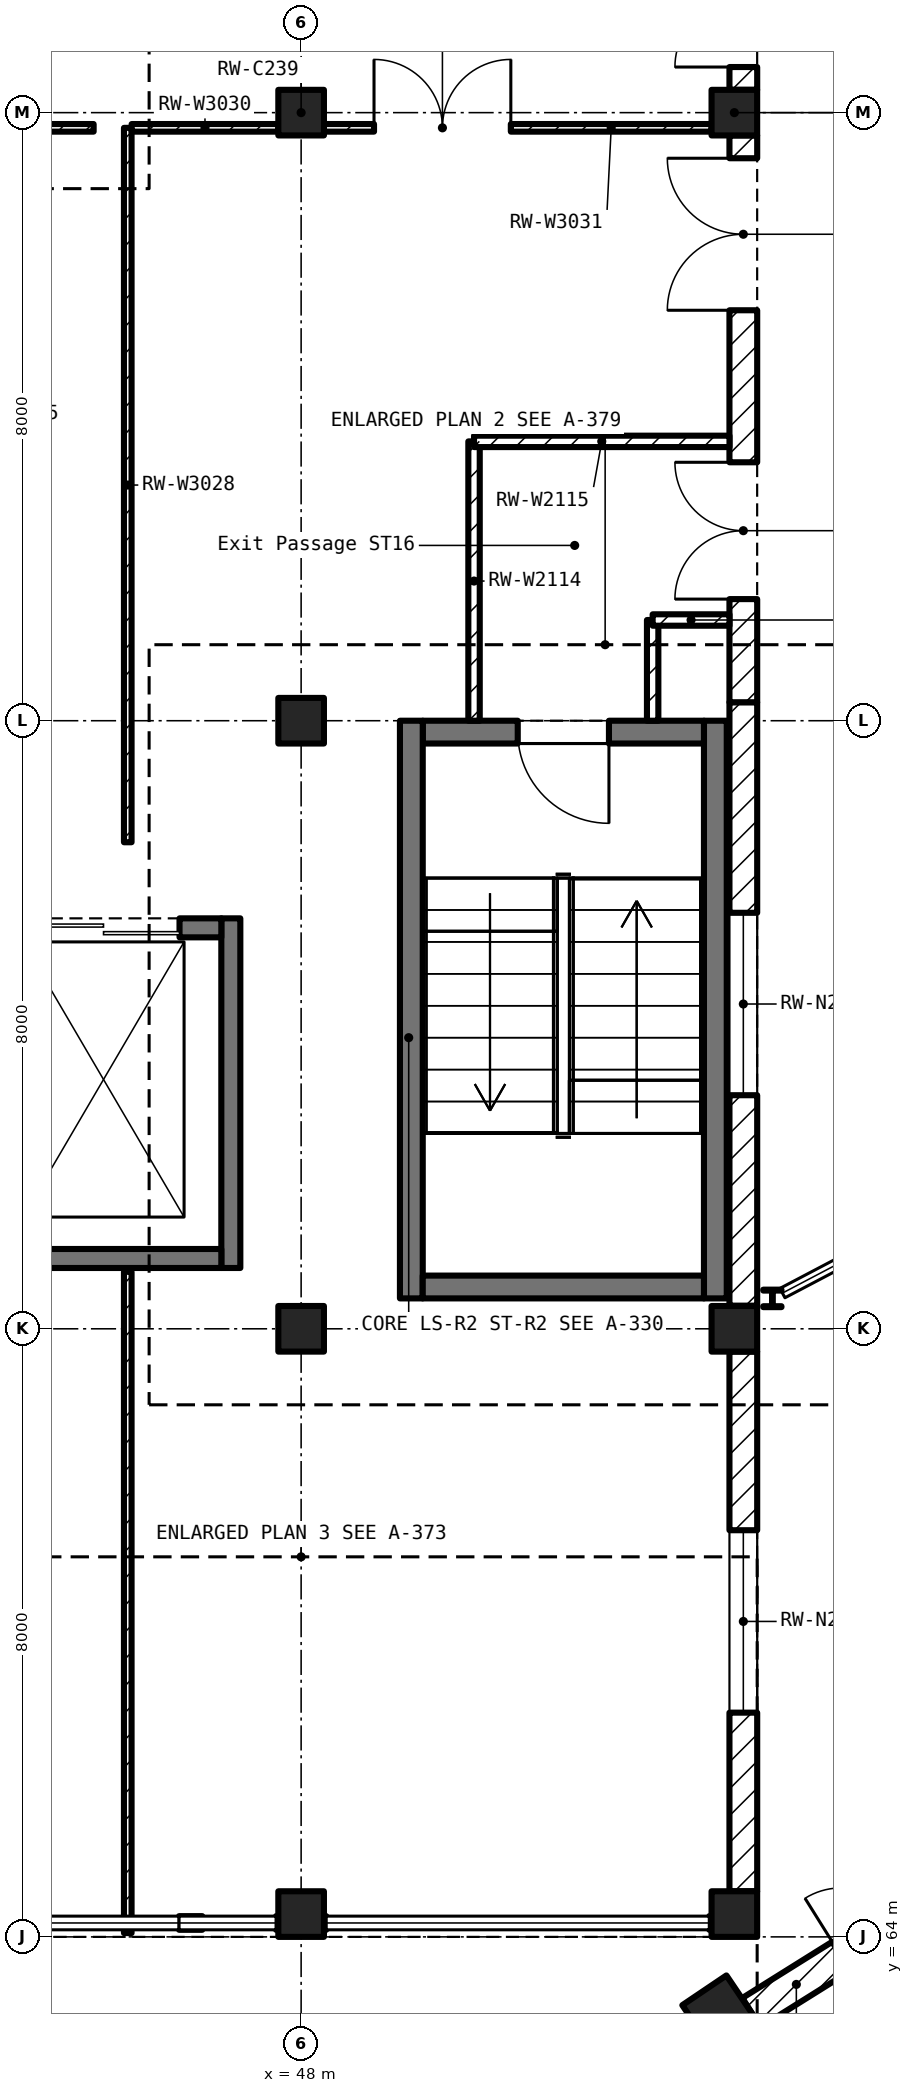
"""IFC4 building model, lengths in metres.
Left out: names, types, materials, properties, quantities, classifications, styles, units other than length and angle.
Written with IfcOpenShell. Run it as: python <this file> out.ifc"""

import sys

from ifc_helpers import new_model, si_unit, direction, frame, frame_2d, origin, origin_2d, place, context, subcontext, project, spatial, rectangle, i_section, extrude, element, fill, save


model = new_model("IFC4")
c1 = context("Model", 3, precision=1e-05, world=origin(), true_north=direction((0.0, 1.0)))
c2 = subcontext(c1, "Body", "Model", "MODEL_VIEW")
j1 = project(units=[si_unit("LENGTHUNIT", "METRE"), si_unit("PLANEANGLEUNIT", "RADIAN")], contexts=[c1])
p1 = place(None, origin())
s1 = spatial("IfcSite", under=j1, at=p1, CompositionType="ELEMENT")
p2 = place(p1, origin())
s2 = spatial("IfcBuilding", under=s1, at=p2, CompositionType="ELEMENT")
p3 = place(p2, origin())
s3 = spatial("IfcBuildingStorey", under=s2, at=p3, CompositionType="ELEMENT", Elevation=0.0)
p4 = place(p3, frame((53.501, 63.007, 0.0), z_axis=(0.0, 0.0, 1.0), x_axis=(0.829037572555, 0.559192903471, 0.0)))
e1 = element("IfcColumn", 1, at=p4, inside=s3, PredefinedType="COLUMN", context=c2, shape_type="SweptSolid", body=[
    extrude(rectangle(XDim=0.7, YDim=0.7, at=origin_2d()), origin(), (0.0, 0.0, 1.0), 6.0),
])
for number, where, z_axis, x_axis in (
    (2, (48.0, 64.3, 0.0), (0.0, 0.0, 1.0), (1.0, 0.0, 0.0)),
    (3, (48.0, 72.0, 0.0), (0.0, 0.0, 1.0), (1.0, 0.0, 0.0)),
    (4, (48.0, 80.0, 0.0), (0.0, 0.0, 1.0), (1.0, 0.0, 0.0)),
    (5, (48.0, 88.0, 0.0), (0.0, 0.0, 1.0), (1.0, 0.0, 0.0)),
    (6, (53.7, 64.3, 0.0), (0.0, 0.0, 1.0), (1.0, 0.0, 0.0)),
    (7, (53.7, 72.0, 0.0), (0.0, 0.0, 1.0), (1.0, 0.0, 0.0)),
    (8, (53.7, 88.0, 0.0), (0.0, 0.0, 1.0), (1.0, 0.0, 0.0)),
):
    element("IfcColumn", number, at=place(p3, frame(where, z_axis=z_axis, x_axis=x_axis)), inside=s3, PredefinedType="COLUMN", context=c2, shape_type="SweptSolid", body=[
        extrude(rectangle(XDim=0.6, YDim=0.6, at=origin_2d()), origin(), (0.0, 0.0, 1.0), 6.0),
    ])
p5 = place(p3, frame((54.2, 72.4, -0.98), z_axis=(0.0, 0.0, 1.0), x_axis=(1.0, 0.0, 0.0)))
e9 = element("IfcColumn", 9, at=p5, inside=s3, PredefinedType="COLUMN", context=c2, shape_type="SweptSolid", body=[
    extrude(i_section(OverallWidth=0.24, OverallDepth=0.23, WebThickness=0.008, FlangeThickness=0.012, FilletRadius=0.021, at=origin_2d()), origin(), (0.0, 0.0, 1.0), 9.13),
])
p6 = place(p3, frame((53.924, 63.005, 0.0), z_axis=(0.0, 0.0, 1.0), x_axis=(0.847929565971, 0.530108904992, 0.0)))
e10 = element("IfcWall", 10, at=p6, inside=s3, PredefinedType="SOLIDWALL", context=c2, shape_type="SweptSolid", body=[
    extrude(rectangle(XDim=4.59, YDim=0.45, at=frame_2d((2.295, 0.0))), origin(), (0.0, 0.0, 1.0), 4.98),
])
p7 = place(p6, frame((1.395, 0.0, 0.0)))
e11 = element("IfcOpeningElement", 11, at=p7, cuts=e10, PredefinedType="OPENING", context=c2, shape_type="SweptSolid", body=[
    extrude(rectangle(XDim=1.8, YDim=2.4, at=frame_2d((0.9, 1.2))), frame((0.0, 0.237, 0.0), z_axis=(0.0, -1.0, 0.0), x_axis=(1.0, 0.0, 0.0)), (0.0, 0.0, 1.0), 0.474),
])
p8 = place(p3, frame((53.818, 64.6, 0.0), z_axis=(0.0, 0.0, 1.0), x_axis=(0.0, 1.0, 0.0)))
e12 = element("IfcWall", 12, at=p8, inside=s3, PredefinedType="SOLIDWALL", context=c2, shape_type="SweptSolid", body=[
    extrude(rectangle(XDim=7.1, YDim=0.365, at=frame_2d((3.55, 0.0))), origin(), (0.0, 0.0, 1.0), 5.05),
])
p9 = place(p8, frame((2.35, 0.0, 1.0)))
e13 = element("IfcOpeningElement", 13, at=p9, cuts=e12, PredefinedType="OPENING", context=c2, shape_type="SweptSolid", body=[
    extrude(rectangle(XDim=2.4, YDim=2.0, at=frame_2d((1.2, 1.0))), frame((0.0, 0.195, 0.0), z_axis=(0.0, -1.0, 0.0), x_axis=(1.0, 0.0, 0.0)), (0.0, 0.0, 1.0), 0.389),
])
p10 = place(p3, frame((53.818, 72.304, 0.0), z_axis=(0.0, 0.0, 1.0), x_axis=(0.0, 1.0, 0.0)))
e14 = element("IfcWall", 14, at=p10, inside=s3, PredefinedType="SOLIDWALL", context=c2, shape_type="SweptSolid", body=[
    extrude(rectangle(XDim=7.939, YDim=0.365, at=frame_2d((3.969, 0.0))), origin(), (0.0, 0.0, 1.0), 5.05),
])
p11 = place(p10, frame((2.769, 0.0, 1.0)))
e15 = element("IfcOpeningElement", 15, at=p11, cuts=e14, PredefinedType="OPENING", context=c2, shape_type="SweptSolid", body=[
    extrude(rectangle(XDim=2.4, YDim=2.0, at=frame_2d((1.2, 1.0))), frame((0.0, 0.195, 0.0), z_axis=(0.0, -1.0, 0.0), x_axis=(1.0, 0.0, 0.0)), (0.0, 0.0, 1.0), 0.389),
])
p12 = place(p3, frame((53.818, 80.243, 0.0), z_axis=(0.0, 0.0, 1.0), x_axis=(0.0, 1.0, 0.0)))
e16 = element("IfcWall", 16, at=p12, inside=s3, PredefinedType="SOLIDWALL", context=c2, shape_type="SweptSolid", body=[
    extrude(rectangle(XDim=7.457, YDim=0.365, at=frame_2d((3.729, 0.0))), origin(), (0.0, 0.0, 1.0), 5.05),
])
p13 = place(p12, frame((5.157, 0.0, 0.0)))
e17 = element("IfcOpeningElement", 17, at=p13, cuts=e16, PredefinedType="OPENING", context=c2, shape_type="SweptSolid", body=[
    extrude(rectangle(XDim=2.0, YDim=2.4, at=frame_2d((1.0, 1.2))), frame((0.0, 0.195, 0.0), z_axis=(0.0, -1.0, 0.0), x_axis=(1.0, 0.0, 0.0)), (0.0, 0.0, 1.0), 0.389),
])
p14 = place(p12, frame((1.357, 0.0, 0.0)))
e18 = element("IfcOpeningElement", 18, at=p14, cuts=e16, PredefinedType="OPENING", context=c2, shape_type="SweptSolid", body=[
    extrude(rectangle(XDim=1.8, YDim=2.4, at=frame_2d((0.9, 1.2))), frame((0.0, 0.195, 0.0), z_axis=(0.0, -1.0, 0.0), x_axis=(1.0, 0.0, 0.0)), (0.0, 0.0, 1.0), 0.389),
])
p15 = place(p3, frame((53.818, 88.3, 0.0), z_axis=(0.0, 0.0, 1.0), x_axis=(0.0, 1.0, 0.0)))
e19 = element("IfcWall", 19, at=p15, inside=s3, PredefinedType="SOLIDWALL", context=c2, shape_type="SweptSolid", body=[
    extrude(rectangle(XDim=7.4, YDim=0.365, at=frame_2d((3.7, 0.0))), origin(), (0.0, 0.0, 1.0), 5.05),
])
p16 = place(p15, frame((2.5, 0.0, 1.0)))
e20 = element("IfcOpeningElement", 20, at=p16, cuts=e19, PredefinedType="OPENING", context=c2, shape_type="SweptSolid", body=[
    extrude(rectangle(XDim=2.4, YDim=2.0, at=frame_2d((1.2, 1.0))), frame((0.0, 0.195, 0.0), z_axis=(0.0, -1.0, 0.0), x_axis=(1.0, 0.0, 0.0)), (0.0, 0.0, 1.0), 0.389),
])
p17 = place(p15, frame((0.3, 0.0, 0.0)))
e21 = element("IfcOpeningElement", 21, at=p17, cuts=e19, PredefinedType="OPENING", context=c2, shape_type="SweptSolid", body=[
    extrude(rectangle(XDim=1.8, YDim=2.4, at=frame_2d((0.9, 1.2))), frame((0.0, 0.195, 0.0), z_axis=(0.0, -1.0, 0.0), x_axis=(1.0, 0.0, 0.0)), (0.0, 0.0, 1.0), 0.389),
])
p18 = place(p3, frame((53.45, 72.4, 0.0), z_axis=(0.0, 0.0, 1.0), x_axis=(0.0, 1.0, 0.0)))
e22 = element("IfcWall", 22, at=p18, inside=s3, PredefinedType="SOLIDWALL", context=c2, shape_type="SweptSolid", body=[
    extrude(rectangle(XDim=7.6, YDim=0.3, at=frame_2d((3.8, 0.0))), origin(), (0.0, 0.0, 1.0), 6.0),
])
p19 = place(p3, frame((53.3, 79.85, 0.0), z_axis=(0.0, 0.0, 1.0), x_axis=(-1.0, 0.0, 0.0)))
e23 = element("IfcWall", 23, at=p19, inside=s3, PredefinedType="SOLIDWALL", context=c2, shape_type="SweptSolid", body=[
    extrude(rectangle(XDim=3.7, YDim=0.3, at=frame_2d((1.85, 0.0))), origin(), (0.0, 0.0, 1.0), 6.0),
])
p20 = place(p19, frame((1.25, 0.0, 0.0)))
e24 = element("IfcOpeningElement", 24, at=p20, cuts=e23, PredefinedType="OPENING", context=c2, shape_type="SweptSolid", body=[
    extrude(rectangle(XDim=1.2, YDim=2.1, at=frame_2d((0.6, 1.05))), frame((0.0, 0.162, 0.0), z_axis=(0.0, -1.0, 0.0), x_axis=(1.0, 0.0, 0.0)), (0.0, 0.0, 1.0), 0.324),
])
p21 = place(p3, frame((49.45, 80.0, 0.0), z_axis=(0.0, 0.0, 1.0), x_axis=(0.0, -1.0, 0.0)))
e25 = element("IfcWall", 25, at=p21, inside=s3, PredefinedType="SOLIDWALL", context=c2, shape_type="SweptSolid", body=[
    extrude(rectangle(XDim=7.6, YDim=0.3, at=frame_2d((3.8, 0.0))), origin(), (0.0, 0.0, 1.0), 6.0),
])
p22 = place(p3, frame((49.6, 72.55, 0.0), z_axis=(0.0, 0.0, 1.0), x_axis=(1.0, 0.0, 0.0)))
e26 = element("IfcWall", 26, at=p22, inside=s3, PredefinedType="SOLIDWALL", context=c2, shape_type="SweptSolid", body=[
    extrude(rectangle(XDim=3.7, YDim=0.3, at=frame_2d((1.85, 0.0))), origin(), (0.0, 0.0, 1.0), 6.0),
])
p23 = place(p3, frame((59.019, 65.542, 0.0), z_axis=(0.0, 0.0, 1.0), x_axis=(-0.819160804606, -0.573563925118, 0.0)))
e27 = element("IfcWall", 27, at=p23, inside=s3, PredefinedType="SOLIDWALL", context=c2, shape_type="SweptSolid", body=[
    extrude(rectangle(XDim=5.0, YDim=0.3, at=frame_2d((2.5, 0.0))), origin(), (0.0, 0.0, 1.0), 6.0),
])
p24 = place(p3, frame((47.075, 72.8, 0.0), z_axis=(0.0, 0.0, 1.0), x_axis=(0.0, 1.0, 0.0)))
e28 = element("IfcWall", 28, at=p24, inside=s3, PredefinedType="SOLIDWALL", context=c2, shape_type="SweptSolid", body=[
    extrude(rectangle(XDim=4.6, YDim=0.25, at=frame_2d((2.3, 0.0))), origin(), (0.0, 0.0, 1.0), 6.0),
])
p25 = place(p3, frame((46.95, 77.275, 0.0), z_axis=(0.0, 0.0, 1.0), x_axis=(-1.0, 0.0, 0.0)))
e29 = element("IfcWall", 29, at=p25, inside=s3, PredefinedType="SOLIDWALL", context=c2, shape_type="SweptSolid", body=[
    extrude(rectangle(XDim=3.1, YDim=0.25, at=frame_2d((1.55, 0.0))), origin(), (0.0, 0.0, 1.0), 6.0),
])
p26 = place(p25, frame((0.55, 0.0, 0.0)))
e30 = element("IfcOpeningElement", 30, at=p26, cuts=e29, PredefinedType="OPENING", context=c2, shape_type="SweptSolid", body=[
    extrude(rectangle(XDim=2.0, YDim=2.2, at=frame_2d((1.0, 1.1))), frame((0.0, 0.137, 0.0), z_axis=(0.0, -1.0, 0.0), x_axis=(1.0, 0.0, 0.0)), (0.0, 0.0, 1.0), 0.274),
])
p27 = place(p3, frame((43.85, 72.925, 0.0), z_axis=(0.0, 0.0, 1.0), x_axis=(1.0, 0.0, 0.0)))
e31 = element("IfcWall", 31, at=p27, inside=s3, PredefinedType="SOLIDWALL", context=c2, shape_type="SweptSolid", body=[
    extrude(rectangle(XDim=3.1, YDim=0.25, at=frame_2d((1.55, 0.0))), origin(), (0.0, 0.0, 1.0), 6.0),
])
p28 = place(p3, frame((45.719, 87.8, 0.0), z_axis=(0.0, 0.0, 1.0), x_axis=(0.0, -1.0, 0.0)))
e32 = element("IfcWall", 32, at=p28, inside=s3, PredefinedType="PARTITIONING", context=c2, shape_type="SweptSolid", body=[
    extrude(rectangle(XDim=9.399, YDim=0.1, at=frame_2d((4.7, 0.0))), origin(), (0.0, 0.0, 1.0), 4.95),
])
p29 = place(p3, frame((45.719, 72.75, 0.0), z_axis=(0.0, 0.0, 1.0), x_axis=(0.0, -1.0, 0.0)))
e33 = element("IfcWall", 33, at=p29, inside=s3, PredefinedType="PARTITIONING", context=c2, shape_type="SweptSolid", body=[
    extrude(rectangle(XDim=8.7, YDim=0.1, at=frame_2d((4.35, 0.0))), origin(), (0.0, 0.0, 1.0), 4.95),
])
p30 = place(p3, frame((45.77, 87.8, 0.0), z_axis=(0.0, 0.0, 1.0), x_axis=(1.0, 0.0, 0.0)))
e34 = element("IfcWall", 34, at=p30, inside=s3, PredefinedType="PARTITIONING", context=c2, shape_type="SweptSolid", body=[
    extrude(rectangle(XDim=1.93, YDim=0.1, at=frame_2d((0.965, 0.0))), origin(), (0.0, 0.0, 1.0), 4.95),
])
p31 = place(p3, frame((48.3, 87.8, 0.0), z_axis=(0.0, 0.0, 1.0), x_axis=(1.0, 0.0, 0.0)))
e35 = element("IfcWall", 35, at=p31, inside=s3, PredefinedType="PARTITIONING", context=c2, shape_type="SweptSolid", body=[
    extrude(rectangle(XDim=5.1, YDim=0.1, at=frame_2d((2.55, 0.0))), origin(), (0.0, 0.0, 1.0), 4.95),
])
p32 = place(p31, frame((0.659, 0.0, 0.0)))
e36 = element("IfcOpeningElement", 36, at=p32, cuts=e35, PredefinedType="OPENING", context=c2, shape_type="SweptSolid", body=[
    extrude(rectangle(XDim=1.8, YDim=2.1, at=frame_2d((0.9, 1.05))), frame((0.0, 0.062, 0.0), z_axis=(0.0, -1.0, 0.0), x_axis=(1.0, 0.0, 0.0)), (0.0, 0.0, 1.0), 0.124),
])
p33 = place(p3, frame((40.3, 87.8, 0.0), z_axis=(0.0, 0.0, 1.0), x_axis=(1.0, 0.0, 0.0)))
e37 = element("IfcWall", 37, at=p33, inside=s3, PredefinedType="PARTITIONING", context=c2, shape_type="SweptSolid", body=[
    extrude(rectangle(XDim=4.97, YDim=0.1, at=frame_2d((2.485, 0.0))), origin(), (0.0, 0.0, 1.0), 4.95),
])
p34 = place(p33, frame((0.909, 0.0, 0.0)))
e38 = element("IfcOpeningElement", 38, at=p34, cuts=e37, PredefinedType="OPENING", context=c2, shape_type="SweptSolid", body=[
    extrude(rectangle(XDim=1.8, YDim=2.1, at=frame_2d((0.9, 1.05))), frame((0.0, 0.062, 0.0), z_axis=(0.0, -1.0, 0.0), x_axis=(1.0, 0.0, 0.0)), (0.0, 0.0, 1.0), 0.124),
])
p35 = place(p3, frame((50.275, 80.0, 0.0), z_axis=(0.0, 0.0, 1.0), x_axis=(0.0, 1.0, 0.0)))
e39 = element("IfcWall", 39, at=p35, inside=s3, PredefinedType="PARTITIONING", context=c2, shape_type="SweptSolid", body=[
    extrude(rectangle(XDim=3.675, YDim=0.15, at=frame_2d((1.837, 0.0))), origin(), (0.0, 0.0, 1.0), 5.85),
])
p36 = place(p3, frame((50.275, 83.675, 0.0), z_axis=(0.0, 0.0, 1.0), x_axis=(1.0, 0.0, 0.0)))
e40 = element("IfcWall", 40, at=p36, inside=s3, PredefinedType="PARTITIONING", context=c2, shape_type="SweptSolid", body=[
    extrude(rectangle(XDim=3.361, YDim=0.15, at=frame_2d((1.681, 0.0))), origin(), (0.0, 0.0, 1.0), 5.05),
])
p37 = place(p3, frame((52.625, 80.0, 0.0), z_axis=(0.0, 0.0, 1.0), x_axis=(0.0, 1.0, 0.0)))
e41 = element("IfcWall", 41, at=p37, inside=s3, PredefinedType="PARTITIONING", context=c2, shape_type="SweptSolid", body=[
    extrude(rectangle(XDim=1.325, YDim=0.15, at=frame_2d((0.663, 0.0))), origin(), (0.0, 0.0, 1.0), 5.85),
])
p38 = place(p3, frame((52.625, 81.325, 0.0), z_axis=(0.0, 0.0, 1.0), x_axis=(1.0, 0.0, 0.0)))
e42 = element("IfcWall", 42, at=p38, inside=s3, PredefinedType="PARTITIONING", context=c2, shape_type="SweptSolid", body=[
    extrude(rectangle(XDim=1.011, YDim=0.15, at=frame_2d((0.505, 0.0))), origin(), (0.0, 0.0, 1.0), 5.05),
])
p39 = place(p3, frame((46.394, 64.183, 0.0), z_axis=(0.0, 0.0, 1.0), x_axis=(1.0, 0.0, 0.0)))
e43 = element("IfcWall", 43, at=p39, inside=s3, PredefinedType="SOLIDWALL", context=c2, shape_type="SweptSolid", body=[
    extrude(rectangle(XDim=0.305, YDim=0.18, at=frame_2d((0.152, 0.0))), origin(), (0.0, 0.0, 1.0), 4.2),
])
p40 = place(p3, frame((47.67, 64.183, 0.0), z_axis=(0.0, 0.0, 1.0), x_axis=(1.0, 0.0, 0.0)))
e44 = element("IfcWall", 44, at=p40, inside=s3, PredefinedType="SOLIDWALL", context=c2, shape_type="SweptSolid", body=[
    extrude(rectangle(XDim=0.305, YDim=0.18, at=frame_2d((0.153, 0.0))), origin(), (0.0, 0.0, 1.0), 4.2),
])
p41 = place(p3, frame((53.37, 64.183, 0.0), z_axis=(0.0, 0.0, 1.0), x_axis=(1.0, 0.0, 0.0)))
e45 = element("IfcWall", 45, at=p41, inside=s3, PredefinedType="SOLIDWALL", context=c2, shape_type="SweptSolid", body=[
    extrude(rectangle(XDim=0.305, YDim=0.18, at=frame_2d((0.152, 0.0))), origin(), (0.0, 0.0, 1.0), 4.2),
])
p42 = place(p3, frame((48.33, 64.183, 0.0), z_axis=(0.0, 0.0, 1.0), x_axis=(-1.0, 0.0, 0.0)))
e46 = element("IfcWall", 46, at=p42, inside=s3, PredefinedType="SOLIDWALL", context=c2, shape_type="SweptSolid", body=[
    extrude(rectangle(XDim=0.305, YDim=0.18, at=frame_2d((0.153, 0.0))), origin(), (0.0, 0.0, 1.0), 4.2),
])
p43 = place(p9, origin())
e47 = element("IfcWindow", 47, at=p43, inside=s3, PartitioningType="DOUBLE_PANEL_VERTICAL", PredefinedType="WINDOW", context=c2, shape_type="SweptSolid", body=[
    extrude(rectangle(XDim=2.4, YDim=2.0, at=frame_2d((1.2, 1.0))), frame((0.0, 0.03, 0.0), z_axis=(0.0, -1.0, 0.0), x_axis=(1.0, 0.0, 0.0)), (0.0, 0.0, 1.0), 0.06),
])
fill(e13, e47)
p44 = place(p11, origin())
e48 = element("IfcWindow", 48, at=p44, inside=s3, PartitioningType="DOUBLE_PANEL_VERTICAL", PredefinedType="WINDOW", context=c2, shape_type="SweptSolid", body=[
    extrude(rectangle(XDim=2.4, YDim=2.0, at=frame_2d((1.2, 1.0))), frame((0.0, 0.03, 0.0), z_axis=(0.0, -1.0, 0.0), x_axis=(1.0, 0.0, 0.0)), (0.0, 0.0, 1.0), 0.06),
])
fill(e15, e48)
p45 = place(p13, origin())
e49 = element("IfcDoor", 49, at=p45, inside=s3, OperationType="DOUBLE_DOOR_DOUBLE_SWING", PredefinedType="DOOR", context=c2, shape_type="SweptSolid", body=[
    extrude(rectangle(XDim=2.0, YDim=2.4, at=frame_2d((1.0, 1.2))), frame((0.0, 0.025, 0.0), z_axis=(0.0, -1.0, 0.0), x_axis=(1.0, 0.0, 0.0)), (0.0, 0.0, 1.0), 0.05),
])
fill(e17, e49)
p46 = place(p17, origin())
e50 = element("IfcDoor", 50, at=p46, inside=s3, OperationType="DOUBLE_DOOR_DOUBLE_SWING", PredefinedType="DOOR", context=c2, shape_type="SweptSolid", body=[
    extrude(rectangle(XDim=1.8, YDim=2.4, at=frame_2d((0.9, 1.2))), frame((0.0, 0.025, 0.0), z_axis=(0.0, -1.0, 0.0), x_axis=(1.0, 0.0, 0.0)), (0.0, 0.0, 1.0), 0.05),
])
fill(e21, e50)
p47 = place(p20, origin())
e51 = element("IfcDoor", 51, at=p47, inside=s3, OperationType="SINGLE_SWING_LEFT", PredefinedType="DOOR", context=c2, shape_type="SweptSolid", body=[
    extrude(rectangle(XDim=1.2, YDim=2.1, at=frame_2d((0.6, 1.05))), frame((0.0, 0.025, 0.0), z_axis=(0.0, -1.0, 0.0), x_axis=(1.0, 0.0, 0.0)), (0.0, 0.0, 1.0), 0.05),
])
fill(e24, e51)
p48 = place(p26, origin())
e52 = element("IfcDoor", 52, at=p48, inside=s3, OperationType="DOUBLE_DOOR_SLIDING", PredefinedType="DOOR", context=c2, shape_type="SweptSolid", body=[
    extrude(rectangle(XDim=2.0, YDim=2.2, at=frame_2d((1.0, 1.1))), frame((0.0, 0.025, 0.0), z_axis=(0.0, -1.0, 0.0), x_axis=(1.0, 0.0, 0.0)), (0.0, 0.0, 1.0), 0.05),
])
fill(e30, e52)
p49 = place(p32, origin())
e53 = element("IfcDoor", 53, at=p49, inside=s3, OperationType="DOUBLE_DOOR_SINGLE_SWING", PredefinedType="DOOR", context=c2, shape_type="SweptSolid", body=[
    extrude(rectangle(XDim=1.8, YDim=2.1, at=frame_2d((0.9, 1.05))), frame((0.0, 0.025, 0.0), z_axis=(0.0, -1.0, 0.0), x_axis=(1.0, 0.0, 0.0)), (0.0, 0.0, 1.0), 0.05),
])
fill(e36, e53)
p50 = place(p14, origin())
e54 = element("IfcDoor", 54, at=p50, inside=s3, OperationType="DOUBLE_DOOR_DOUBLE_SWING", PredefinedType="DOOR", context=c2, shape_type="SweptSolid", body=[
    extrude(rectangle(XDim=1.8, YDim=2.4, at=frame_2d((0.9, 1.2))), frame((0.0, 0.025, 0.0), z_axis=(0.0, -1.0, 0.0), x_axis=(1.0, 0.0, 0.0)), (0.0, 0.0, 1.0), 0.05),
])
fill(e18, e54)
save(model, sys.argv[1])
